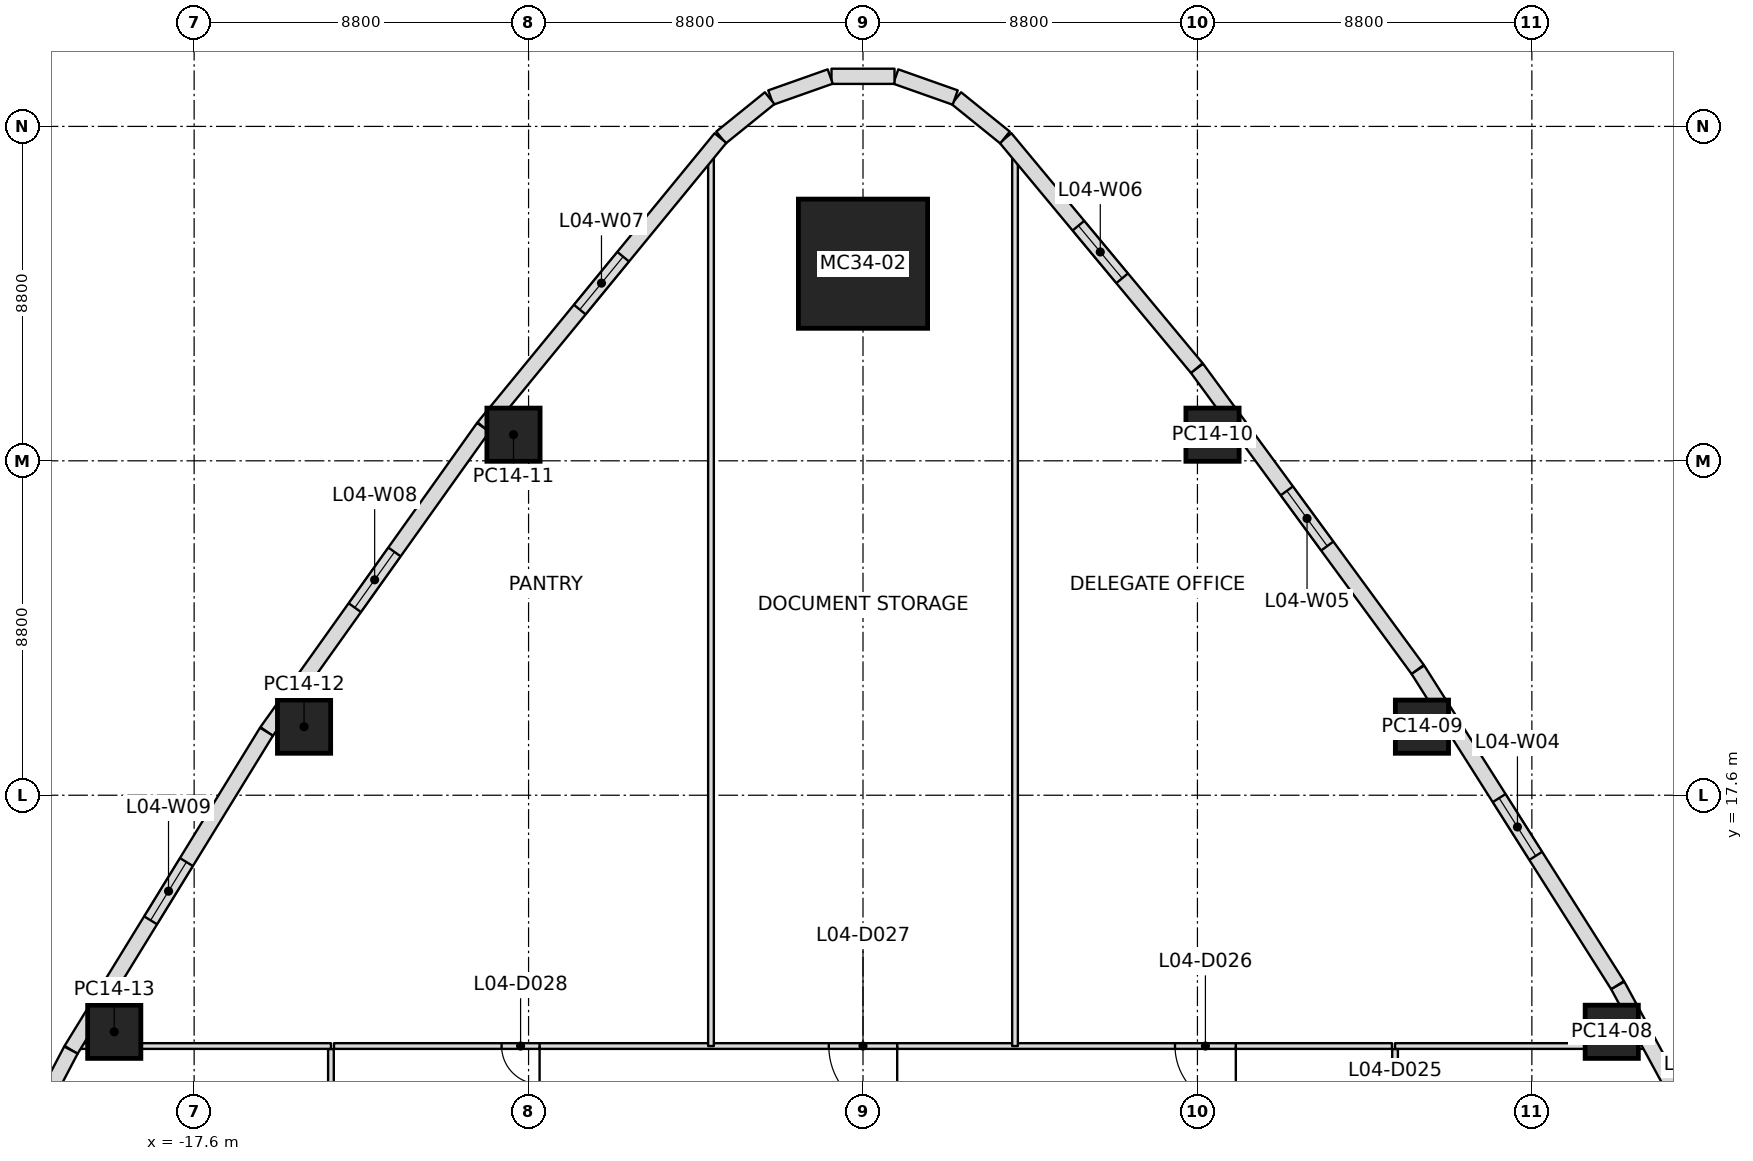
"""IFC4 building model, lengths in metres.
Left out: names, types, materials, properties, quantities, classifications, styles, units other than length and angle.
Written with IfcOpenShell. Run it as: python <this file> out.ifc"""

import sys

from ifc_helpers import new_model, si_unit, direction, frame, frame_2d, origin, origin_2d, place, context, subcontext, project, spatial, rectangle, extrude, clip, halfspace, element, fill, save


model = new_model("IFC4")
c1 = context("Model", 3, precision=1e-05, world=origin(), true_north=direction((0.0, 1.0)))
c2 = subcontext(c1, "Body", "Model", "MODEL_VIEW")
j1 = project(units=[si_unit("LENGTHUNIT", "METRE"), si_unit("PLANEANGLEUNIT", "RADIAN")], contexts=[c1])
p1 = place(None, origin())
s1 = spatial("IfcSite", under=j1, at=p1, CompositionType="ELEMENT")
p2 = place(p1, origin())
s2 = spatial("IfcBuilding", under=s1, at=p2, CompositionType="ELEMENT")
p3 = place(p2, frame((0.0, 0.0, 28.8)))
s3 = spatial("IfcBuildingStorey", under=s2, at=p3, CompositionType="ELEMENT", Elevation=28.8)
p4 = place(p3, frame((0.0, 31.587, 0.0), z_axis=(0.0, 0.0, 1.0), x_axis=(1.0, 0.0, 0.0)))
e1 = element("IfcColumn", 1, at=p4, inside=s3, PredefinedType="COLUMN", context=c2, shape_type="SweptSolid", body=[
    extrude(rectangle(XDim=3.4, YDim=3.4, at=origin_2d()), origin(), (0.0, 0.0, 1.0), 5.4),
])
for number, where, z_axis, x_axis in (
    (2, (19.702, 11.375, 0.0), (0.0, 0.0, 1.0), (-0.5, 0.866, 0.0)),
    (3, (14.708, 19.404, 0.0), (0.0, 0.0, 1.0), (-0.556, 0.831, 0.0)),
    (4, (9.197, 27.087, 0.0), (0.0, 0.0, 1.0), (-0.609, 0.793, 0.0)),
    (5, (-9.197, 27.087, 0.0), (0.0, 0.0, 1.0), (0.609, 0.793, 0.0)),
    (6, (-14.708, 19.404, 0.0), (0.0, 0.0, 1.0), (0.556, 0.831, 0.0)),
    (7, (-19.702, 11.375, 0.0), (0.0, 0.0, 1.0), (0.5, 0.866, 0.0)),
):
    element("IfcColumn", number, at=place(p3, frame(where, z_axis=z_axis, x_axis=x_axis)), inside=s3, PredefinedType="COLUMN", context=c2, shape_type="SweptSolid", body=[
        clip(extrude(rectangle(XDim=1.4, YDim=1.4, at=origin_2d()), origin(), (0.0, 0.0, 1.0), 5.4), halfspace(frame((0.0, 0.0, 5.394)), False)),
    ])
p5 = place(p3, frame((19.859, 12.597, 0.0), z_axis=(0.0, 0.0, 1.0), x_axis=(0.476254331716, -0.879307575039, 0.0)))
e8 = element("IfcWall", 8, at=p5, inside=s3, PredefinedType="STANDARD", context=c2, shape_type="SweptSolid", body=[
    extrude(rectangle(XDim=9.825, YDim=0.4, at=frame_2d((4.913, 0.0))), origin(), (0.0, 0.0, 1.0), 4.5),
])
p6 = place(p5, frame((4.0, 0.0, 0.9)))
e9 = element("IfcOpeningElement", 9, at=p6, cuts=e8, PredefinedType="OPENING", context=c2, shape_type="SweptSolid", body=[
    extrude(rectangle(XDim=1.8, YDim=1.5, at=frame_2d((0.9, 0.75))), frame((0.0, 0.2, 0.0), z_axis=(0.0, -1.0, 0.0), x_axis=(1.0, 0.0, 0.0)), (0.0, 0.0, 1.0), 0.4),
])
p7 = place(p3, frame((14.599, 20.905, 0.0), z_axis=(0.0, 0.0, 1.0), x_axis=(0.534912566476, -0.844907418731, 0.0)))
e10 = element("IfcWall", 10, at=p7, inside=s3, PredefinedType="STANDARD", context=c2, shape_type="SweptSolid", body=[
    extrude(rectangle(XDim=9.826, YDim=0.4, at=frame_2d((4.913, 0.0))), origin(), (0.0, 0.0, 1.0), 4.5),
])
p8 = place(p7, frame((4.0, 0.0, 0.9)))
e11 = element("IfcOpeningElement", 11, at=p8, cuts=e10, PredefinedType="OPENING", context=c2, shape_type="SweptSolid", body=[
    extrude(rectangle(XDim=1.8, YDim=1.5, at=frame_2d((0.9, 0.75))), frame((0.0, 0.2, 0.0), z_axis=(0.0, -1.0, 0.0), x_axis=(1.0, 0.0, 0.0)), (0.0, 0.0, 1.0), 0.4),
])
p9 = place(p3, frame((8.788, 28.836, 0.0), z_axis=(0.0, 0.0, 1.0), x_axis=(0.591085715329, -0.806608750966, 0.0)))
e12 = element("IfcWall", 12, at=p9, inside=s3, PredefinedType="STANDARD", context=c2, shape_type="SweptSolid", body=[
    extrude(rectangle(XDim=9.826, YDim=0.4, at=frame_2d((4.913, 0.0))), origin(), (0.0, 0.0, 1.0), 4.5),
])
p10 = place(p9, frame((4.0, 0.0, 0.9)))
e13 = element("IfcOpeningElement", 13, at=p10, cuts=e12, PredefinedType="OPENING", context=c2, shape_type="SweptSolid", body=[
    extrude(rectangle(XDim=1.8, YDim=1.5, at=frame_2d((0.9, 0.75))), frame((0.0, 0.2, 0.0), z_axis=(0.0, -1.0, 0.0), x_axis=(1.0, 0.0, 0.0)), (0.0, 0.0, 1.0), 0.4),
])
p11 = place(p3, frame((3.75, 34.894, 0.0), z_axis=(0.0, 0.0, 1.0), x_axis=(0.639357483443, -0.768909623015, 0.0)))
e14 = element("IfcWall", 14, at=p11, inside=s3, PredefinedType="STANDARD", context=c2, shape_type="SweptSolid", body=[
    extrude(rectangle(XDim=7.874, YDim=0.4, at=frame_2d((3.937, 0.0))), origin(), (0.0, 0.0, 1.0), 4.5),
])
p12 = place(p11, frame((3.0, 0.0, 0.9)))
e15 = element("IfcOpeningElement", 15, at=p12, cuts=e14, PredefinedType="OPENING", context=c2, shape_type="SweptSolid", body=[
    extrude(rectangle(XDim=1.8, YDim=1.5, at=frame_2d((0.9, 0.75))), frame((0.0, 0.2, 0.0), z_axis=(0.0, -1.0, 0.0), x_axis=(1.0, 0.0, 0.0)), (0.0, 0.0, 1.0), 0.4),
])
p13 = place(p3, frame((2.456, 35.943, 0.0), z_axis=(0.0, 0.0, 1.0), x_axis=(0.77769018818, -0.628647732207, 0.0)))
e16 = element("IfcWall", 16, at=p13, inside=s3, PredefinedType="STANDARD", context=c2, shape_type="SweptSolid", body=[
    extrude(rectangle(XDim=1.646, YDim=0.4, at=frame_2d((0.823, 0.0))), origin(), (0.0, 0.0, 1.0), 4.5),
])
for number, where, z_axis, x_axis in (
    (17, (0.863, 36.513, 0.0), (0.0, 0.0, 1.0), (0.943, -0.333, 0.0)),
    (18, (-0.829, 36.519, 0.0), (0.0, 0.0, 1.0), (1.0, 0.0, 0.0)),
    (19, (-2.427, 35.96, 0.0), (0.0, 0.0, 1.0), (0.943, 0.333, 0.0)),
):
    element("IfcWall", number, at=place(p3, frame(where, z_axis=z_axis, x_axis=x_axis)), inside=s3, PredefinedType="STANDARD", context=c2, shape_type="SweptSolid", body=[
        extrude(rectangle(XDim=1.659, YDim=0.4, at=frame_2d((0.829, 0.0))), origin(), (0.0, 0.0, 1.0), 4.5),
    ])
p14 = place(p3, frame((-3.736, 34.908, 0.0), z_axis=(0.0, 0.0, 1.0), x_axis=(0.77769018818, 0.628647732207, 0.0)))
e20 = element("IfcWall", 20, at=p14, inside=s3, PredefinedType="STANDARD", context=c2, shape_type="SweptSolid", body=[
    extrude(rectangle(XDim=1.646, YDim=0.4, at=frame_2d((0.823, 0.0))), origin(), (0.0, 0.0, 1.0), 4.5),
])
p15 = place(p3, frame((-9.989, 27.287, 0.0), z_axis=(0.0, 0.0, 1.0), x_axis=(0.634103626557, 0.773248078424, 0.0)))
e21 = element("IfcWall", 21, at=p15, inside=s3, PredefinedType="STANDARD", context=c2, shape_type="SweptSolid", body=[
    extrude(rectangle(XDim=9.838, YDim=0.4, at=frame_2d((4.919, 0.0))), origin(), (0.0, 0.0, 1.0), 4.5),
])
p16 = place(p15, frame((4.0, 0.0, 0.9)))
e22 = element("IfcOpeningElement", 22, at=p16, cuts=e21, PredefinedType="OPENING", context=c2, shape_type="SweptSolid", body=[
    extrude(rectangle(XDim=1.8, YDim=1.5, at=frame_2d((0.9, 0.75))), frame((0.0, 0.2, 0.0), z_axis=(0.0, -1.0, 0.0), x_axis=(1.0, 0.0, 0.0)), (0.0, 0.0, 1.0), 0.4),
])
p17 = place(p3, frame((-15.692, 19.278, 0.0), z_axis=(0.0, 0.0, 1.0), x_axis=(0.580062373049, 0.814572061498, 0.0)))
e23 = element("IfcWall", 23, at=p17, inside=s3, PredefinedType="STANDARD", context=c2, shape_type="SweptSolid", body=[
    extrude(rectangle(XDim=9.826, YDim=0.4, at=frame_2d((4.913, 0.0))), origin(), (0.0, 0.0, 1.0), 4.5),
])
p18 = place(p17, frame((4.0, 0.0, 0.9)))
e24 = element("IfcOpeningElement", 24, at=p18, cuts=e23, PredefinedType="OPENING", context=c2, shape_type="SweptSolid", body=[
    extrude(rectangle(XDim=1.8, YDim=1.5, at=frame_2d((0.9, 0.75))), frame((0.0, 0.2, 0.0), z_axis=(0.0, -1.0, 0.0), x_axis=(1.0, 0.0, 0.0)), (0.0, 0.0, 1.0), 0.4),
])
p19 = place(p3, frame((-20.839, 10.9, 0.0), z_axis=(0.0, 0.0, 1.0), x_axis=(0.523369396098, 0.85210590611, 0.0)))
e25 = element("IfcWall", 25, at=p19, inside=s3, PredefinedType="STANDARD", context=c2, shape_type="SweptSolid", body=[
    extrude(rectangle(XDim=9.825, YDim=0.4, at=frame_2d((4.913, 0.0))), origin(), (0.0, 0.0, 1.0), 4.5),
])
p20 = place(p19, frame((4.0, 0.0, 0.9)))
e26 = element("IfcOpeningElement", 26, at=p20, cuts=e25, PredefinedType="OPENING", context=c2, shape_type="SweptSolid", body=[
    extrude(rectangle(XDim=1.8, YDim=1.5, at=frame_2d((0.9, 0.75))), frame((0.0, 0.2, 0.0), z_axis=(0.0, -1.0, 0.0), x_axis=(1.0, 0.0, 0.0)), (0.0, 0.0, 1.0), 0.4),
])
p21 = place(p3, frame((-25.404, 2.191, 0.0), z_axis=(0.0, 0.0, 1.0), x_axis=(0.464246519602, 0.885706028566, 0.0)))
e27 = element("IfcWall", 27, at=p21, inside=s3, PredefinedType="STANDARD", context=c2, shape_type="SweptSolid", body=[
    extrude(rectangle(XDim=9.826, YDim=0.4, at=frame_2d((4.913, 0.0))), origin(), (0.0, 0.0, 1.0), 4.5),
])
p22 = place(p21, frame((4.0, 0.0, 0.9)))
e28 = element("IfcOpeningElement", 28, at=p22, cuts=e27, PredefinedType="OPENING", context=c2, shape_type="SweptSolid", body=[
    extrude(rectangle(XDim=1.8, YDim=1.5, at=frame_2d((0.9, 0.75))), frame((0.0, 0.2, 0.0), z_axis=(0.0, -1.0, 0.0), x_axis=(1.0, 0.0, 0.0)), (0.0, 0.0, 1.0), 0.4),
])
p23 = place(p3, frame((-14.0, 11.0, 0.0), z_axis=(0.0, 0.0, 1.0), x_axis=(-1.0, 0.0, 0.0)))
e29 = element("IfcWall", 29, at=p23, inside=s3, PredefinedType="PARTITIONING", context=c2, shape_type="SweptSolid", body=[
    extrude(rectangle(XDim=6.642, YDim=0.15, at=frame_2d((3.321, 0.0))), origin(), (0.0, 0.0, 1.0), 4.6),
])
for number, where, z_axis, x_axis in (
    (30, (-4.0, 11.0, 0.0), (0.0, 0.0, 1.0), (0.0, 1.0, 0.0)),
    (31, (4.0, 11.0, 0.0), (0.0, 0.0, 1.0), (0.0, 1.0, 0.0)),
):
    element("IfcWall", number, at=place(p3, frame(where, z_axis=z_axis, x_axis=x_axis)), inside=s3, PredefinedType="PARTITIONING", context=c2, shape_type="SweptSolid", body=[
        extrude(rectangle(XDim=23.423, YDim=0.15, at=frame_2d((11.711, 0.0))), origin(), (0.0, 0.0, 1.0), 4.384),
    ])
p24 = place(p3, frame((14.0, 11.0, 0.0), z_axis=(0.0, 0.0, 1.0), x_axis=(1.0, 0.0, 0.0)))
e32 = element("IfcWall", 32, at=p24, inside=s3, PredefinedType="PARTITIONING", context=c2, shape_type="SweptSolid", body=[
    extrude(rectangle(XDim=6.642, YDim=0.15, at=frame_2d((3.321, 0.0))), origin(), (0.0, 0.0, 1.0), 4.6),
])
p25 = place(p3, frame((-14.0, 10.92, 0.0), z_axis=(0.0, 0.0, 1.0), x_axis=(0.0, -1.0, 0.0)))
e33 = element("IfcWall", 33, at=p25, inside=s3, PredefinedType="PARTITIONING", context=c2, shape_type="SweptSolid", body=[
    extrude(rectangle(XDim=21.84, YDim=0.15, at=frame_2d((10.92, 0.0))), origin(), (0.0, 0.0, 1.0), 4.097),
])
p26 = place(p25, frame((5.12, 0.0, 0.0)))
e34 = element("IfcOpeningElement", 34, at=p26, cuts=e33, PredefinedType="OPENING", context=c2, shape_type="SweptSolid", body=[
    extrude(rectangle(XDim=1.6, YDim=2.1, at=frame_2d((0.8, 1.05))), frame((0.0, 0.075, 0.0), z_axis=(0.0, -1.0, 0.0), x_axis=(1.0, 0.0, 0.0)), (0.0, 0.0, 1.0), 0.15),
])
p27 = place(p25, frame((16.43, 0.0, 0.0)))
e35 = element("IfcOpeningElement", 35, at=p27, cuts=e33, PredefinedType="OPENING", context=c2, shape_type="SweptSolid", body=[
    extrude(rectangle(XDim=1.0, YDim=2.1, at=frame_2d((0.5, 1.05))), frame((0.0, 0.075, 0.0), z_axis=(0.0, -1.0, 0.0), x_axis=(1.0, 0.0, 0.0)), (0.0, 0.0, 1.0), 0.15),
])
p28 = place(p3, frame((13.92, 11.0, 0.0), z_axis=(0.0, 0.0, 1.0), x_axis=(-1.0, 0.0, 0.0)))
e36 = element("IfcWall", 36, at=p28, inside=s3, PredefinedType="PARTITIONING", context=c2, shape_type="SweptSolid", body=[
    extrude(rectangle(XDim=27.84, YDim=0.15, at=frame_2d((13.92, 0.0))), origin(), (0.0, 0.0, 1.0), 4.097),
])
p29 = place(p28, frame((4.11, 0.0, 0.0)))
e37 = element("IfcOpeningElement", 37, at=p29, cuts=e36, PredefinedType="OPENING", context=c2, shape_type="SweptSolid", body=[
    extrude(rectangle(XDim=1.6, YDim=2.1, at=frame_2d((0.8, 1.05))), frame((0.0, 0.075, 0.0), z_axis=(0.0, -1.0, 0.0), x_axis=(1.0, 0.0, 0.0)), (0.0, 0.0, 1.0), 0.15),
])
p30 = place(p28, frame((13.02, 0.0, 0.0)))
e38 = element("IfcOpeningElement", 38, at=p30, cuts=e36, PredefinedType="OPENING", context=c2, shape_type="SweptSolid", body=[
    extrude(rectangle(XDim=1.8, YDim=2.1, at=frame_2d((0.9, 1.05))), frame((0.0, 0.075, 0.0), z_axis=(0.0, -1.0, 0.0), x_axis=(1.0, 0.0, 0.0)), (0.0, 0.0, 1.0), 0.15),
])
p31 = place(p28, frame((22.43, 0.0, 0.0)))
e39 = element("IfcOpeningElement", 39, at=p31, cuts=e36, PredefinedType="OPENING", context=c2, shape_type="SweptSolid", body=[
    extrude(rectangle(XDim=1.0, YDim=2.1, at=frame_2d((0.5, 1.05))), frame((0.0, 0.075, 0.0), z_axis=(0.0, -1.0, 0.0), x_axis=(1.0, 0.0, 0.0)), (0.0, 0.0, 1.0), 0.15),
])
p32 = place(p3, frame((14.0, -10.92, 0.0), z_axis=(0.0, 0.0, 1.0), x_axis=(0.0, 1.0, 0.0)))
e40 = element("IfcWall", 40, at=p32, inside=s3, PredefinedType="PARTITIONING", context=c2, shape_type="SweptSolid", body=[
    extrude(rectangle(XDim=21.84, YDim=0.15, at=frame_2d((10.92, 0.0))), origin(), (0.0, 0.0, 1.0), 4.097),
])
p33 = place(p32, frame((13.52, 0.0, 0.0)))
e41 = element("IfcOpeningElement", 41, at=p33, cuts=e40, PredefinedType="OPENING", context=c2, shape_type="SweptSolid", body=[
    extrude(rectangle(XDim=1.0, YDim=2.1, at=frame_2d((0.5, 1.05))), frame((0.0, 0.075, 0.0), z_axis=(0.0, -1.0, 0.0), x_axis=(1.0, 0.0, 0.0)), (0.0, 0.0, 1.0), 0.15),
])
p34 = place(p32, frame((18.57, 0.0, 0.0)))
e42 = element("IfcOpeningElement", 42, at=p34, cuts=e40, PredefinedType="OPENING", context=c2, shape_type="SweptSolid", body=[
    extrude(rectangle(XDim=1.0, YDim=2.1, at=frame_2d((0.5, 1.05))), frame((0.0, 0.075, 0.0), z_axis=(0.0, -1.0, 0.0), x_axis=(1.0, 0.0, 0.0)), (0.0, 0.0, 1.0), 0.15),
])
p35 = place(p32, frame((1.41, 0.0, 0.0)))
e43 = element("IfcOpeningElement", 43, at=p35, cuts=e40, PredefinedType="OPENING", context=c2, shape_type="SweptSolid", body=[
    extrude(rectangle(XDim=1.0, YDim=2.1, at=frame_2d((0.5, 1.05))), frame((0.0, 0.075, 0.0), z_axis=(0.0, -1.0, 0.0), x_axis=(1.0, 0.0, 0.0)), (0.0, 0.0, 1.0), 0.15),
])
p36 = place(p32, frame((7.12, 0.0, 0.0)))
e44 = element("IfcOpeningElement", 44, at=p36, cuts=e40, PredefinedType="OPENING", context=c2, shape_type="SweptSolid", body=[
    extrude(rectangle(XDim=1.6, YDim=2.1, at=frame_2d((0.8, 1.05))), frame((0.0, 0.075, 0.0), z_axis=(0.0, -1.0, 0.0), x_axis=(1.0, 0.0, 0.0)), (0.0, 0.0, 1.0), 0.15),
])
p37 = place(p8, origin())
e45 = element("IfcWindow", 45, at=p37, inside=s3, PartitioningType="SINGLE_PANEL", PredefinedType="WINDOW", context=c2, shape_type="SweptSolid", body=[
    extrude(rectangle(XDim=1.8, YDim=1.5, at=frame_2d((0.9, 0.75))), frame((0.0, 0.03, 0.0), z_axis=(0.0, -1.0, 0.0), x_axis=(1.0, 0.0, 0.0)), (0.0, 0.0, 1.0), 0.06),
])
fill(e11, e45)
p38 = place(p10, origin())
e46 = element("IfcWindow", 46, at=p38, inside=s3, PartitioningType="SINGLE_PANEL", PredefinedType="WINDOW", context=c2, shape_type="SweptSolid", body=[
    extrude(rectangle(XDim=1.8, YDim=1.5, at=frame_2d((0.9, 0.75))), frame((0.0, 0.03, 0.0), z_axis=(0.0, -1.0, 0.0), x_axis=(1.0, 0.0, 0.0)), (0.0, 0.0, 1.0), 0.06),
])
fill(e13, e46)
p39 = place(p12, origin())
e47 = element("IfcWindow", 47, at=p39, inside=s3, PartitioningType="SINGLE_PANEL", PredefinedType="WINDOW", context=c2, shape_type="SweptSolid", body=[
    extrude(rectangle(XDim=1.8, YDim=1.5, at=frame_2d((0.9, 0.75))), frame((0.0, 0.03, 0.0), z_axis=(0.0, -1.0, 0.0), x_axis=(1.0, 0.0, 0.0)), (0.0, 0.0, 1.0), 0.06),
])
fill(e15, e47)
p40 = place(p16, origin())
e48 = element("IfcWindow", 48, at=p40, inside=s3, PartitioningType="SINGLE_PANEL", PredefinedType="WINDOW", context=c2, shape_type="SweptSolid", body=[
    extrude(rectangle(XDim=1.8, YDim=1.5, at=frame_2d((0.9, 0.75))), frame((0.0, 0.03, 0.0), z_axis=(0.0, -1.0, 0.0), x_axis=(1.0, 0.0, 0.0)), (0.0, 0.0, 1.0), 0.06),
])
fill(e22, e48)
p41 = place(p18, origin())
e49 = element("IfcWindow", 49, at=p41, inside=s3, PartitioningType="SINGLE_PANEL", PredefinedType="WINDOW", context=c2, shape_type="SweptSolid", body=[
    extrude(rectangle(XDim=1.8, YDim=1.5, at=frame_2d((0.9, 0.75))), frame((0.0, 0.03, 0.0), z_axis=(0.0, -1.0, 0.0), x_axis=(1.0, 0.0, 0.0)), (0.0, 0.0, 1.0), 0.06),
])
fill(e24, e49)
p42 = place(p20, origin())
e50 = element("IfcWindow", 50, at=p42, inside=s3, PartitioningType="SINGLE_PANEL", PredefinedType="WINDOW", context=c2, shape_type="SweptSolid", body=[
    extrude(rectangle(XDim=1.8, YDim=1.5, at=frame_2d((0.9, 0.75))), frame((0.0, 0.03, 0.0), z_axis=(0.0, -1.0, 0.0), x_axis=(1.0, 0.0, 0.0)), (0.0, 0.0, 1.0), 0.06),
])
fill(e26, e50)
p43 = place(p29, origin())
e51 = element("IfcDoor", 51, at=p43, inside=s3, OperationType="DOUBLE_DOOR_SINGLE_SWING", PredefinedType="DOOR", context=c2, shape_type="SweptSolid", body=[
    extrude(rectangle(XDim=1.6, YDim=2.1, at=frame_2d((0.8, 1.05))), frame((0.0, 0.025, 0.0), z_axis=(0.0, -1.0, 0.0), x_axis=(1.0, 0.0, 0.0)), (0.0, 0.0, 1.0), 0.05),
])
fill(e37, e51)
p44 = place(p30, origin())
e52 = element("IfcDoor", 52, at=p44, inside=s3, OperationType="DOUBLE_DOOR_SINGLE_SWING", PredefinedType="DOOR", context=c2, shape_type="SweptSolid", body=[
    extrude(rectangle(XDim=1.8, YDim=2.1, at=frame_2d((0.9, 1.05))), frame((0.0, 0.025, 0.0), z_axis=(0.0, -1.0, 0.0), x_axis=(1.0, 0.0, 0.0)), (0.0, 0.0, 1.0), 0.05),
])
fill(e38, e52)
p45 = place(p31, origin())
e53 = element("IfcDoor", 53, at=p45, inside=s3, OperationType="SINGLE_SWING_LEFT", PredefinedType="DOOR", context=c2, shape_type="SweptSolid", body=[
    extrude(rectangle(XDim=1.0, YDim=2.1, at=frame_2d((0.5, 1.05))), frame((0.0, 0.025, 0.0), z_axis=(0.0, -1.0, 0.0), x_axis=(1.0, 0.0, 0.0)), (0.0, 0.0, 1.0), 0.05),
])
fill(e39, e53)
save(model, sys.argv[1])
